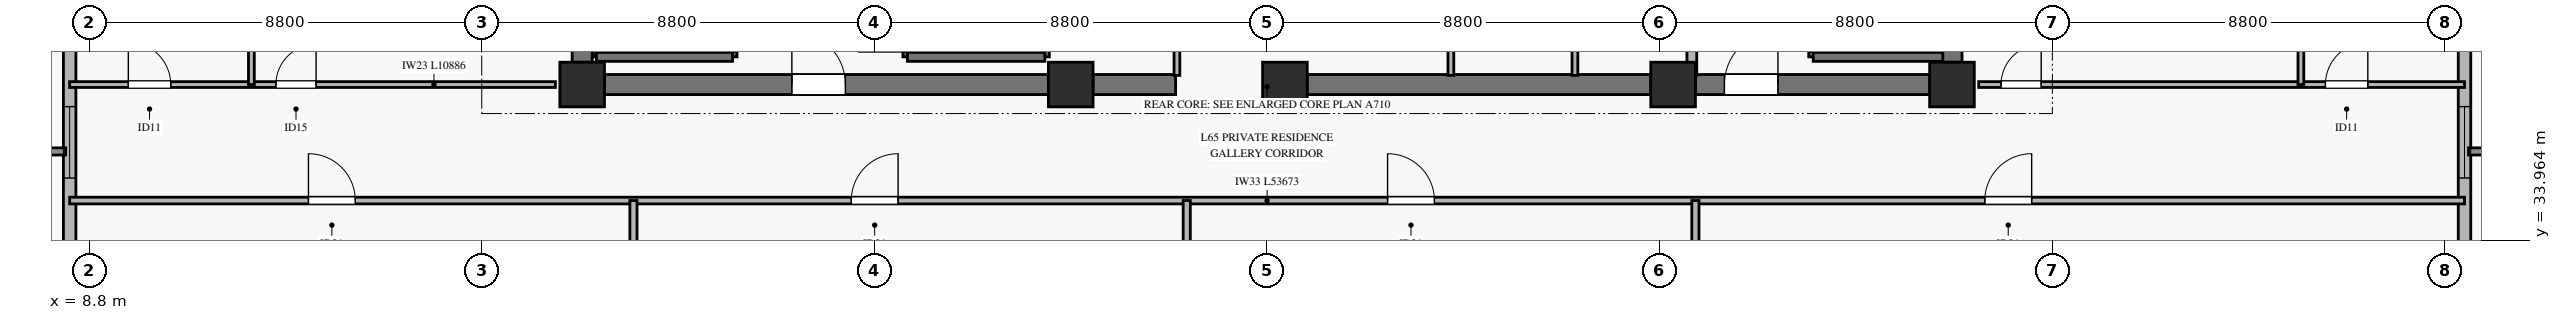
"""IFC4 building model, lengths in metres.
Left out: names, types, materials, properties, quantities, classifications, styles, units other than length and angle.
Written with IfcOpenShell. Run it as: python <this file> out.ifc"""

import sys

from ifc_helpers import new_model, si_unit, direction, frame, frame_2d, origin, origin_2d, place, context, subcontext, project, spatial, rectangle, extrude, source, transform, mapped, element, fill, save


model = new_model("IFC4")
c1 = context("Model", 3, precision=1e-05, world=origin(), true_north=direction((0.0, 1.0)))
c2 = subcontext(c1, "Body", "Model", "MODEL_VIEW")
j1 = project(units=[si_unit("LENGTHUNIT", "METRE"), si_unit("PLANEANGLEUNIT", "RADIAN")], contexts=[c1])
p1 = place(None, origin())
s1 = spatial("IfcSite", under=j1, at=p1, CompositionType="ELEMENT")
p2 = place(p1, origin())
s2 = spatial("IfcBuilding", under=s1, at=p2, CompositionType="ELEMENT")
p3 = place(p2, frame((0.0, 0.0, 255.3)))
s3 = spatial("IfcBuildingStorey", under=s2, at=p3, CompositionType="ELEMENT", Elevation=255.3)
m1 = source(origin(), c2, "Body", "SweptSolid", [
    extrude(rectangle(XDim=1.0, YDim=1.0, at=origin_2d()), origin(), (0.0, 0.0, 1.0), 3.185),
])
for number, where, z_axis, x_axis in (
    (1, (19.85, 37.45, 0.0), (0.0, 0.0, 1.0), (1.0, 0.0, 0.0)),
    (2, (30.8, 37.45, 0.0), (0.0, 0.0, 1.0), (1.0, 0.0, 0.0)),
    (3, (35.6, 37.45, 0.0), (0.0, 0.0, 1.0), (1.0, 0.0, 0.0)),
    (4, (44.3, 37.45, 0.0), (0.0, 0.0, 1.0), (1.0, 0.0, 0.0)),
    (5, (50.55, 37.45, 0.0), (0.0, 0.0, 1.0), (1.0, 0.0, 0.0)),
):
    element("IfcColumn", number, at=place(p3, frame(where, z_axis=z_axis, x_axis=x_axis)), inside=s3, PredefinedType="PILASTER", context=c2, shape_type="MappedRepresentation", body=[
        mapped(m1, transform((0.0, 0.0, 0.0), x_axis=(1.0, 0.0, 0.0), y_axis=(0.0, 1.0, 0.0), z_axis=(0.0, 0.0, 1.0), scale=1.0)),
    ])
p4 = place(p3, frame((20.35, 37.45, 0.0), z_axis=(0.0, 0.0, 1.0), x_axis=(1.0, 0.0, 0.0)))
e6 = element("IfcWall", 6, at=p4, inside=s3, PredefinedType="SHEAR", context=c2, shape_type="SweptSolid", body=[
    extrude(rectangle(XDim=9.95, YDim=0.45, at=frame_2d((4.975, 0.0))), origin(), (0.0, 0.0, 1.0), 3.185),
])
p5 = place(p4, frame((4.2, 0.0, 0.0)))
e7 = element("IfcOpeningElement", 7, at=p5, cuts=e6, PredefinedType="OPENING", context=c2, shape_type="SweptSolid", body=[
    extrude(rectangle(XDim=1.2, YDim=2.15, at=frame_2d((0.6, 1.075))), frame((0.0, 0.235, 0.0), z_axis=(0.0, -1.0, 0.0), x_axis=(1.0, 0.0, 0.0)), (0.0, 0.0, 1.0), 0.47),
])
p6 = place(p3, frame((31.3, 37.45, 0.0), z_axis=(0.0, 0.0, 1.0), x_axis=(1.0, 0.0, 0.0)))
e8 = element("IfcWall", 8, at=p6, inside=s3, PredefinedType="SHEAR", context=c2, shape_type="SweptSolid", body=[
    extrude(rectangle(XDim=1.85, YDim=0.45, at=frame_2d((0.925, 0.0))), origin(), (0.0, 0.0, 1.0), 3.185),
])
p7 = place(p3, frame((36.1, 37.45, 0.0), z_axis=(0.0, 0.0, 1.0), x_axis=(1.0, 0.0, 0.0)))
e9 = element("IfcWall", 9, at=p7, inside=s3, PredefinedType="SHEAR", context=c2, shape_type="SweptSolid", body=[
    extrude(rectangle(XDim=7.7, YDim=0.45, at=frame_2d((3.85, 0.0))), origin(), (0.0, 0.0, 1.0), 3.185),
])
p8 = place(p3, frame((44.8, 37.45, 0.0), z_axis=(0.0, 0.0, 1.0), x_axis=(1.0, 0.0, 0.0)))
e10 = element("IfcWall", 10, at=p8, inside=s3, PredefinedType="SHEAR", context=c2, shape_type="SweptSolid", body=[
    extrude(rectangle(XDim=5.25, YDim=0.45, at=frame_2d((2.625, 0.0))), origin(), (0.0, 0.0, 1.0), 3.185),
])
p9 = place(p8, frame((0.65, 0.0, 0.0)))
e11 = element("IfcOpeningElement", 11, at=p9, cuts=e10, PredefinedType="OPENING", context=c2, shape_type="SweptSolid", body=[
    extrude(rectangle(XDim=1.2, YDim=2.15, at=frame_2d((0.6, 1.075))), frame((0.0, 0.235, 0.0), z_axis=(0.0, -1.0, 0.0), x_axis=(1.0, 0.0, 0.0)), (0.0, 0.0, 1.0), 0.47),
])
for number, where, z_axis, x_axis in (
    (12, (19.85, 37.95, 0.0), (0.0, 0.0, 1.0), (0.0, 1.0, 0.0)),
    (13, (50.55, 37.95, 0.0), (0.0, 0.0, 1.0), (0.0, 1.0, 0.0)),
):
    element("IfcWall", number, at=place(p3, frame(where, z_axis=z_axis, x_axis=x_axis)), inside=s3, PredefinedType="SHEAR", context=c2, shape_type="SweptSolid", body=[
        extrude(rectangle(XDim=8.1, YDim=0.45, at=frame_2d((4.05, 0.0))), origin(), (0.0, 0.0, 1.0), 3.185),
    ])
p10 = place(p3, frame((8.364, 30.857, 0.0), z_axis=(0.0, 0.0, 1.0), x_axis=(0.0, 1.0, 0.0)))
e14 = element("IfcWall", 14, at=p10, inside=s3, PredefinedType="SOLIDWALL", context=c2, shape_type="SweptSolid", body=[
    extrude(rectangle(XDim=12.628, YDim=0.28, at=frame_2d((6.314, 0.0))), origin(), (0.0, 0.0, 1.0), 2.815),
])
p11 = place(p10, frame((4.498, 0.0, 0.45)))
e15 = element("IfcOpeningElement", 15, at=p11, cuts=e14, PredefinedType="OPENING", context=c2, shape_type="SweptSolid", body=[
    extrude(rectangle(XDim=1.6, YDim=2.0, at=frame_2d((0.8, 1.0))), frame((0.0, 0.15, 0.0), z_axis=(0.0, -1.0, 0.0), x_axis=(1.0, 0.0, 0.0)), (0.0, 0.0, 1.0), 0.3),
])
p12 = place(p3, frame((62.037, 30.857, 0.0), z_axis=(0.0, 0.0, 1.0), x_axis=(0.0, 1.0, 0.0)))
e16 = element("IfcWall", 16, at=p12, inside=s3, PredefinedType="SOLIDWALL", context=c2, shape_type="SweptSolid", body=[
    extrude(rectangle(XDim=12.628, YDim=0.28, at=frame_2d((6.314, 0.0))), origin(), (0.0, 0.0, 1.0), 2.815),
])
p13 = place(p12, frame((4.498, 0.0, 0.45)))
e17 = element("IfcOpeningElement", 17, at=p13, cuts=e16, PredefinedType="OPENING", context=c2, shape_type="SweptSolid", body=[
    extrude(rectangle(XDim=1.6, YDim=2.0, at=frame_2d((0.8, 1.0))), frame((0.0, 0.15, 0.0), z_axis=(0.0, -1.0, 0.0), x_axis=(1.0, 0.0, 0.0)), (0.0, 0.0, 1.0), 0.3),
])
p14 = place(p3, frame((20.17, 38.07, 0.0), z_axis=(0.0, 0.0, 1.0), x_axis=(0.0, 1.0, 0.0)))
e18 = element("IfcWall", 18, at=p14, inside=s3, PredefinedType="SOLIDWALL", context=c2, shape_type="SweptSolid", body=[
    extrude(rectangle(XDim=7.25, YDim=0.14, at=frame_2d((3.625, 0.0))), origin(), (0.0, 0.0, 1.0), 3.4),
])
p15 = place(p3, frame((23.22, 38.07, 0.0), z_axis=(0.0, 0.0, 1.0), x_axis=(0.0, 1.0, 0.0)))
e19 = element("IfcWall", 19, at=p15, inside=s3, PredefinedType="SOLIDWALL", context=c2, shape_type="SweptSolid", body=[
    extrude(rectangle(XDim=7.25, YDim=0.2, at=frame_2d((3.625, 0.0))), origin(), (0.0, 0.0, 1.0), 3.4),
])
p16 = place(p15, frame((0.11, 0.0, 0.0)))
e20 = element("IfcOpeningElement", 20, at=p16, cuts=e19, PredefinedType="OPENING", context=c2, shape_type="SweptSolid", body=[
    extrude(rectangle(XDim=1.1, YDim=2.15, at=frame_2d((0.55, 1.075))), frame((0.0, 0.11, 0.0), z_axis=(0.0, -1.0, 0.0), x_axis=(1.0, 0.0, 0.0)), (0.0, 0.0, 1.0), 0.22),
])
p17 = place(p3, frame((20.17, 38.07, 0.0), z_axis=(0.0, 0.0, 1.0), x_axis=(1.0, 0.0, 0.0)))
e21 = element("IfcWall", 21, at=p17, inside=s3, PredefinedType="SOLIDWALL", context=c2, shape_type="SweptSolid", body=[
    extrude(rectangle(XDim=3.05, YDim=0.2, at=frame_2d((1.525, 0.0))), origin(), (0.0, 0.0, 1.0), 3.4),
])
p18 = place(p3, frame((27.14, 38.07, 0.0), z_axis=(0.0, 0.0, 1.0), x_axis=(0.0, 1.0, 0.0)))
e22 = element("IfcWall", 22, at=p18, inside=s3, PredefinedType="SOLIDWALL", context=c2, shape_type="SweptSolid", body=[
    extrude(rectangle(XDim=7.25, YDim=0.2, at=frame_2d((3.625, 0.0))), origin(), (0.0, 0.0, 1.0), 3.4),
])
p19 = place(p18, frame((0.11, 0.0, 0.0)))
e23 = element("IfcOpeningElement", 23, at=p19, cuts=e22, PredefinedType="OPENING", context=c2, shape_type="SweptSolid", body=[
    extrude(rectangle(XDim=1.1, YDim=2.15, at=frame_2d((0.55, 1.075))), frame((0.0, 0.11, 0.0), z_axis=(0.0, -1.0, 0.0), x_axis=(1.0, 0.0, 0.0)), (0.0, 0.0, 1.0), 0.22),
])
p20 = place(p3, frame((30.22, 38.07, 0.0), z_axis=(0.0, 0.0, 1.0), x_axis=(0.0, 1.0, 0.0)))
e24 = element("IfcWall", 24, at=p20, inside=s3, PredefinedType="SOLIDWALL", context=c2, shape_type="SweptSolid", body=[
    extrude(rectangle(XDim=7.25, YDim=0.2, at=frame_2d((3.625, 0.0))), origin(), (0.0, 0.0, 1.0), 3.4),
])
p21 = place(p3, frame((27.14, 38.07, 0.0), z_axis=(0.0, 0.0, 1.0), x_axis=(1.0, 0.0, 0.0)))
e25 = element("IfcWall", 25, at=p21, inside=s3, PredefinedType="SOLIDWALL", context=c2, shape_type="SweptSolid", body=[
    extrude(rectangle(XDim=3.08, YDim=0.2, at=frame_2d((1.54, 0.0))), origin(), (0.0, 0.0, 1.0), 3.4),
])
p22 = place(p3, frame((47.44, 38.07, 0.0), z_axis=(0.0, 0.0, 1.0), x_axis=(0.0, 1.0, 0.0)))
e26 = element("IfcWall", 26, at=p22, inside=s3, PredefinedType="SOLIDWALL", context=c2, shape_type="SweptSolid", body=[
    extrude(rectangle(XDim=7.25, YDim=0.2, at=frame_2d((3.625, 0.0))), origin(), (0.0, 0.0, 1.0), 3.4),
])
p23 = place(p22, frame((0.11, 0.0, 0.0)))
e27 = element("IfcOpeningElement", 27, at=p23, cuts=e26, PredefinedType="OPENING", context=c2, shape_type="SweptSolid", body=[
    extrude(rectangle(XDim=1.1, YDim=2.15, at=frame_2d((0.55, 1.075))), frame((0.0, 0.11, 0.0), z_axis=(0.0, -1.0, 0.0), x_axis=(1.0, 0.0, 0.0)), (0.0, 0.0, 1.0), 0.22),
])
p24 = place(p3, frame((47.44, 38.07, 0.0), z_axis=(0.0, 0.0, 1.0), x_axis=(1.0, 0.0, 0.0)))
e28 = element("IfcWall", 28, at=p24, inside=s3, PredefinedType="SOLIDWALL", context=c2, shape_type="SweptSolid", body=[
    extrude(rectangle(XDim=2.905, YDim=0.2, at=frame_2d((1.453, 0.0))), origin(), (0.0, 0.0, 1.0), 3.4),
])
p25 = place(p3, frame((44.72, 37.655, 0.0), z_axis=(0.0, 0.0, 1.0), x_axis=(0.0, 1.0, 0.0)))
e29 = element("IfcWall", 29, at=p25, inside=s3, PredefinedType="SOLIDWALL", context=c2, shape_type="SweptSolid", body=[
    extrude(rectangle(XDim=7.565, YDim=0.22, at=frame_2d((3.782, 0.0))), origin(), (0.0, 0.0, 1.0), 3.185),
])
p26 = place(p3, frame((33.18, 37.655, 0.0), z_axis=(0.0, 0.0, 1.0), x_axis=(0.0, 1.0, 0.0)))
e30 = element("IfcWall", 30, at=p26, inside=s3, PredefinedType="PARTITIONING", context=c2, shape_type="SweptSolid", body=[
    extrude(rectangle(XDim=6.495, YDim=0.13, at=frame_2d((3.248, 0.0))), origin(), (0.0, 0.0, 1.0), 2.27),
])
p27 = place(p26, frame((0.945, 0.0, 0.0)))
e31 = element("IfcOpeningElement", 31, at=p27, cuts=e30, PredefinedType="OPENING", context=c2, shape_type="SweptSolid", body=[
    extrude(rectangle(XDim=0.9, YDim=2.1, at=frame_2d((0.45, 1.05))), frame((0.0, 0.075, 0.0), z_axis=(0.0, -1.0, 0.0), x_axis=(1.0, 0.0, 0.0)), (0.0, 0.0, 1.0), 0.15),
])
p28 = place(p26, frame((3.845, 0.0, 0.0)))
e32 = element("IfcOpeningElement", 32, at=p28, cuts=e30, PredefinedType="OPENING", context=c2, shape_type="SweptSolid", body=[
    extrude(rectangle(XDim=0.9, YDim=2.1, at=frame_2d((0.45, 1.05))), frame((0.0, 0.075, 0.0), z_axis=(0.0, -1.0, 0.0), x_axis=(1.0, 0.0, 0.0)), (0.0, 0.0, 1.0), 0.15),
])
p29 = place(p3, frame((39.32, 37.655, 0.0), z_axis=(0.0, 0.0, 1.0), x_axis=(0.0, 1.0, 0.0)))
e33 = element("IfcWall", 33, at=p29, inside=s3, PredefinedType="PARTITIONING", context=c2, shape_type="SweptSolid", body=[
    extrude(rectangle(XDim=8.69, YDim=0.13, at=frame_2d((4.345, 0.0))), origin(), (0.0, 0.0, 1.0), 3.185),
])
p30 = place(p29, frame((4.865, 0.0, 0.0)))
e34 = element("IfcOpeningElement", 34, at=p30, cuts=e33, PredefinedType="OPENING", context=c2, shape_type="SweptSolid", body=[
    extrude(rectangle(XDim=0.9, YDim=2.1, at=frame_2d((0.45, 1.05))), frame((0.0, 0.075, 0.0), z_axis=(0.0, -1.0, 0.0), x_axis=(1.0, 0.0, 0.0)), (0.0, 0.0, 1.0), 0.15),
])
p31 = place(p3, frame((42.1, 37.655, 0.0), z_axis=(0.0, 0.0, 1.0), x_axis=(0.0, 1.0, 0.0)))
e35 = element("IfcWall", 35, at=p31, inside=s3, PredefinedType="PARTITIONING", context=c2, shape_type="SweptSolid", body=[
    extrude(rectangle(XDim=8.69, YDim=0.13, at=frame_2d((4.345, 0.0))), origin(), (0.0, 0.0, 1.0), 3.185),
])
p32 = place(p31, frame((2.145, 0.0, 0.0)))
e36 = element("IfcOpeningElement", 36, at=p32, cuts=e35, PredefinedType="OPENING", context=c2, shape_type="SweptSolid", body=[
    extrude(rectangle(XDim=0.9, YDim=2.1, at=frame_2d((0.45, 1.05))), frame((0.0, 0.075, 0.0), z_axis=(0.0, -1.0, 0.0), x_axis=(1.0, 0.0, 0.0)), (0.0, 0.0, 1.0), 0.15),
])
p33 = place(p3, frame((8.364, 34.85, 0.0), z_axis=(0.0, 0.0, 1.0), x_axis=(1.0, 0.0, 0.0)))
e37 = element("IfcWall", 37, at=p33, inside=s3, PredefinedType="PARTITIONING", context=c2, shape_type="SweptSolid", body=[
    extrude(rectangle(XDim=53.673, YDim=0.15, at=frame_2d((26.836, 0.0))), origin(), (0.0, 0.0, 1.0), 2.47),
])
p34 = place(p33, frame((5.352, 0.0, 0.0)))
e38 = element("IfcOpeningElement", 38, at=p34, cuts=e37, PredefinedType="OPENING", context=c2, shape_type="SweptSolid", body=[
    extrude(rectangle(XDim=1.05, YDim=2.15, at=frame_2d((0.525, 1.075))), frame((0.0, 0.085, 0.0), z_axis=(0.0, -1.0, 0.0), x_axis=(1.0, 0.0, 0.0)), (0.0, 0.0, 1.0), 0.17),
])
p35 = place(p33, frame((17.517, 0.0, 0.0)))
e39 = element("IfcOpeningElement", 39, at=p35, cuts=e37, PredefinedType="OPENING", context=c2, shape_type="SweptSolid", body=[
    extrude(rectangle(XDim=1.05, YDim=2.15, at=frame_2d((0.525, 1.075))), frame((0.0, 0.085, 0.0), z_axis=(0.0, -1.0, 0.0), x_axis=(1.0, 0.0, 0.0)), (0.0, 0.0, 1.0), 0.17),
])
p36 = place(p33, frame((29.537, 0.0, 0.0)))
e40 = element("IfcOpeningElement", 40, at=p36, cuts=e37, PredefinedType="OPENING", context=c2, shape_type="SweptSolid", body=[
    extrude(rectangle(XDim=1.05, YDim=2.15, at=frame_2d((0.525, 1.075))), frame((0.0, 0.085, 0.0), z_axis=(0.0, -1.0, 0.0), x_axis=(1.0, 0.0, 0.0)), (0.0, 0.0, 1.0), 0.17),
])
p37 = place(p33, frame((42.922, 0.0, 0.0)))
e41 = element("IfcOpeningElement", 41, at=p37, cuts=e37, PredefinedType="OPENING", context=c2, shape_type="SweptSolid", body=[
    extrude(rectangle(XDim=1.05, YDim=2.15, at=frame_2d((0.525, 1.075))), frame((0.0, 0.085, 0.0), z_axis=(0.0, -1.0, 0.0), x_axis=(1.0, 0.0, 0.0)), (0.0, 0.0, 1.0), 0.17),
])
for number, where, z_axis, x_axis in (
    (42, (21.0, 15.113, 0.0), (0.0, 0.0, 1.0), (0.0, 1.0, 0.0)),
    (43, (33.4, 15.113, 0.0), (0.0, 0.0, 1.0), (0.0, 1.0, 0.0)),
    (44, (44.8, 15.113, 0.0), (0.0, 0.0, 1.0), (0.0, 1.0, 0.0)),
):
    element("IfcWall", number, at=place(p3, frame(where, z_axis=z_axis, x_axis=x_axis)), inside=s3, PredefinedType="PARTITIONING", context=c2, shape_type="SweptSolid", body=[
        extrude(rectangle(XDim=19.737, YDim=0.16, at=frame_2d((9.869, 0.0))), origin(), (0.0, 0.0, 1.0), 2.77),
    ])
p38 = place(p3, frame((8.364, 37.45, 0.0), z_axis=(0.0, 0.0, 1.0), x_axis=(1.0, 0.0, 0.0)))
e45 = element("IfcWall", 45, at=p38, inside=s3, PredefinedType="PARTITIONING", context=c2, shape_type="SweptSolid", body=[
    extrude(rectangle(XDim=10.886, YDim=0.13, at=frame_2d((5.443, 0.0))), origin(), (0.0, 0.0, 1.0), 2.82),
])
p39 = place(p38, frame((1.315, 0.0, 0.0)))
e46 = element("IfcOpeningElement", 46, at=p39, cuts=e45, PredefinedType="OPENING", context=c2, shape_type="SweptSolid", body=[
    extrude(rectangle(XDim=0.95, YDim=2.1, at=frame_2d((0.475, 1.05))), frame((0.0, 0.075, 0.0), z_axis=(0.0, -1.0, 0.0), x_axis=(1.0, 0.0, 0.0)), (0.0, 0.0, 1.0), 0.15),
])
p40 = place(p38, frame((4.623, 0.0, 0.0)))
e47 = element("IfcOpeningElement", 47, at=p40, cuts=e45, PredefinedType="OPENING", context=c2, shape_type="SweptSolid", body=[
    extrude(rectangle(XDim=0.9, YDim=2.1, at=frame_2d((0.45, 1.05))), frame((0.0, 0.075, 0.0), z_axis=(0.0, -1.0, 0.0), x_axis=(1.0, 0.0, 0.0)), (0.0, 0.0, 1.0), 0.15),
])
p41 = place(p3, frame((12.437, 37.45, 0.0), z_axis=(0.0, 0.0, 1.0), x_axis=(0.0, 1.0, 0.0)))
e48 = element("IfcWall", 48, at=p41, inside=s3, PredefinedType="PARTITIONING", context=c2, shape_type="SweptSolid", body=[
    extrude(rectangle(XDim=8.8, YDim=0.13, at=frame_2d((4.4, 0.0))), origin(), (0.0, 0.0, 1.0), 3.185),
])
p42 = place(p3, frame((51.15, 37.45, 0.0), z_axis=(0.0, 0.0, 1.0), x_axis=(1.0, 0.0, 0.0)))
e49 = element("IfcWall", 49, at=p42, inside=s3, PredefinedType="PARTITIONING", context=c2, shape_type="SweptSolid", body=[
    extrude(rectangle(XDim=10.887, YDim=0.13, at=frame_2d((5.444, 0.0))), origin(), (0.0, 0.0, 1.0), 2.82),
])
p43 = place(p42, frame((0.5, 0.0, 0.0)))
e50 = element("IfcOpeningElement", 50, at=p43, cuts=e49, PredefinedType="OPENING", context=c2, shape_type="SweptSolid", body=[
    extrude(rectangle(XDim=0.9, YDim=2.1, at=frame_2d((0.45, 1.05))), frame((0.0, 0.075, 0.0), z_axis=(0.0, -1.0, 0.0), x_axis=(1.0, 0.0, 0.0)), (0.0, 0.0, 1.0), 0.15),
])
p44 = place(p42, frame((7.77, 0.0, 0.0)))
e51 = element("IfcOpeningElement", 51, at=p44, cuts=e49, PredefinedType="OPENING", context=c2, shape_type="SweptSolid", body=[
    extrude(rectangle(XDim=0.95, YDim=2.1, at=frame_2d((0.475, 1.05))), frame((0.0, 0.075, 0.0), z_axis=(0.0, -1.0, 0.0), x_axis=(1.0, 0.0, 0.0)), (0.0, 0.0, 1.0), 0.15),
])
p45 = place(p3, frame((58.37, 37.45, 0.0), z_axis=(0.0, 0.0, 1.0), x_axis=(0.0, 1.0, 0.0)))
e52 = element("IfcWall", 52, at=p45, inside=s3, PredefinedType="PARTITIONING", context=c2, shape_type="SweptSolid", body=[
    extrude(rectangle(XDim=8.8, YDim=0.13, at=frame_2d((4.4, 0.0))), origin(), (0.0, 0.0, 1.0), 3.185),
])
m2 = source(origin(), c2, "Body", "SweptSolid", [
    extrude(rectangle(XDim=1.6, YDim=2.0, at=frame_2d((0.8, 1.0))), frame((0.0, 0.03, 0.0), z_axis=(0.0, -1.0, 0.0), x_axis=(1.0, 0.0, 0.0)), (0.0, 0.0, 1.0), 0.06),
])
p46 = place(p11, origin())
e53 = element("IfcWindow", 53, at=p46, inside=s3, PartitioningType="SINGLE_PANEL", PredefinedType="WINDOW", context=c2, shape_type="MappedRepresentation", body=[
    mapped(m2, transform((0.0, 0.0, 0.0), x_axis=(1.0, 0.0, 0.0), y_axis=(0.0, 1.0, 0.0), z_axis=(0.0, 0.0, 1.0), scale=1.0)),
])
fill(e15, e53)
p47 = place(p13, origin())
e54 = element("IfcWindow", 54, at=p47, inside=s3, PartitioningType="SINGLE_PANEL", PredefinedType="WINDOW", context=c2, shape_type="MappedRepresentation", body=[
    mapped(m2, transform((0.0, 0.0, 0.0), x_axis=(1.0, 0.0, 0.0), y_axis=(0.0, 1.0, 0.0), z_axis=(0.0, 0.0, 1.0), scale=1.0)),
])
fill(e17, e54)
m3 = source(origin(), c2, "Body", "SweptSolid", [
    extrude(rectangle(XDim=1.2, YDim=2.15, at=frame_2d((0.6, 1.075))), frame((0.0, 0.025, 0.0), z_axis=(0.0, -1.0, 0.0), x_axis=(1.0, 0.0, 0.0)), (0.0, 0.0, 1.0), 0.05),
])
p48 = place(p5, origin())
e55 = element("IfcDoor", 55, at=p48, inside=s3, OperationType="SINGLE_SWING_LEFT", PredefinedType="DOOR", context=c2, shape_type="MappedRepresentation", body=[
    mapped(m3, transform((0.0, 0.0, 0.0), x_axis=(1.0, 0.0, 0.0), y_axis=(0.0, 1.0, 0.0), z_axis=(0.0, 0.0, 1.0), scale=1.0)),
])
fill(e7, e55)
p49 = place(p9, origin())
e56 = element("IfcDoor", 56, at=p49, inside=s3, OperationType="SINGLE_SWING_RIGHT", PredefinedType="DOOR", context=c2, shape_type="MappedRepresentation", body=[
    mapped(m3, transform((0.0, 0.0, 0.0), x_axis=(1.0, 0.0, 0.0), y_axis=(0.0, 1.0, 0.0), z_axis=(0.0, 0.0, 1.0), scale=1.0)),
])
fill(e11, e56)
m4 = source(origin(), c2, "Body", "SweptSolid", [
    extrude(rectangle(XDim=1.05, YDim=2.15, at=frame_2d((0.525, 1.075))), frame((0.0, 0.025, 0.0), z_axis=(0.0, -1.0, 0.0), x_axis=(1.0, 0.0, 0.0)), (0.0, 0.0, 1.0), 0.05),
])
p50 = place(p34, origin())
e57 = element("IfcDoor", 57, at=p50, inside=s3, OperationType="SINGLE_SWING_LEFT", PredefinedType="DOOR", context=c2, shape_type="MappedRepresentation", body=[
    mapped(m4, transform((0.0, 0.0, 0.0), x_axis=(1.0, 0.0, 0.0), y_axis=(0.0, 1.0, 0.0), z_axis=(0.0, 0.0, 1.0), scale=1.0)),
])
fill(e38, e57)
p51 = place(p35, origin())
e58 = element("IfcDoor", 58, at=p51, inside=s3, OperationType="SINGLE_SWING_RIGHT", PredefinedType="DOOR", context=c2, shape_type="MappedRepresentation", body=[
    mapped(m4, transform((0.0, 0.0, 0.0), x_axis=(1.0, 0.0, 0.0), y_axis=(0.0, 1.0, 0.0), z_axis=(0.0, 0.0, 1.0), scale=1.0)),
])
fill(e39, e58)
p52 = place(p36, origin())
e59 = element("IfcDoor", 59, at=p52, inside=s3, OperationType="SINGLE_SWING_LEFT", PredefinedType="DOOR", context=c2, shape_type="MappedRepresentation", body=[
    mapped(m4, transform((0.0, 0.0, 0.0), x_axis=(1.0, 0.0, 0.0), y_axis=(0.0, 1.0, 0.0), z_axis=(0.0, 0.0, 1.0), scale=1.0)),
])
fill(e40, e59)
p53 = place(p37, origin())
e60 = element("IfcDoor", 60, at=p53, inside=s3, OperationType="SINGLE_SWING_RIGHT", PredefinedType="DOOR", context=c2, shape_type="MappedRepresentation", body=[
    mapped(m4, transform((0.0, 0.0, 0.0), x_axis=(1.0, 0.0, 0.0), y_axis=(0.0, 1.0, 0.0), z_axis=(0.0, 0.0, 1.0), scale=1.0)),
])
fill(e41, e60)
m5 = source(origin(), c2, "Body", "SweptSolid", [
    extrude(rectangle(XDim=0.95, YDim=2.1, at=frame_2d((0.475, 1.05))), frame((0.0, 0.025, 0.0), z_axis=(0.0, -1.0, 0.0), x_axis=(1.0, 0.0, 0.0)), (0.0, 0.0, 1.0), 0.05),
])
p54 = place(p39, origin())
e61 = element("IfcDoor", 61, at=p54, inside=s3, OperationType="SINGLE_SWING_LEFT", PredefinedType="DOOR", context=c2, shape_type="MappedRepresentation", body=[
    mapped(m5, transform((0.0, 0.0, 0.0), x_axis=(1.0, 0.0, 0.0), y_axis=(0.0, 1.0, 0.0), z_axis=(0.0, 0.0, 1.0), scale=1.0)),
])
fill(e46, e61)
m6 = source(origin(), c2, "Body", "SweptSolid", [
    extrude(rectangle(XDim=0.9, YDim=2.1, at=frame_2d((0.45, 1.05))), frame((0.0, 0.025, 0.0), z_axis=(0.0, -1.0, 0.0), x_axis=(1.0, 0.0, 0.0)), (0.0, 0.0, 1.0), 0.05),
])
p55 = place(p40, origin())
e62 = element("IfcDoor", 62, at=p55, inside=s3, OperationType="SINGLE_SWING_RIGHT", PredefinedType="DOOR", context=c2, shape_type="MappedRepresentation", body=[
    mapped(m6, transform((0.0, 0.0, 0.0), x_axis=(1.0, 0.0, 0.0), y_axis=(0.0, 1.0, 0.0), z_axis=(0.0, 0.0, 1.0), scale=1.0)),
])
fill(e47, e62)
p56 = place(p43, origin())
e63 = element("IfcDoor", 63, at=p56, inside=s3, OperationType="SINGLE_SWING_RIGHT", PredefinedType="DOOR", context=c2, shape_type="MappedRepresentation", body=[
    mapped(m6, transform((0.0, 0.0, 0.0), x_axis=(1.0, 0.0, 0.0), y_axis=(0.0, 1.0, 0.0), z_axis=(0.0, 0.0, 1.0), scale=1.0)),
])
fill(e50, e63)
p57 = place(p44, origin())
e64 = element("IfcDoor", 64, at=p57, inside=s3, OperationType="SINGLE_SWING_RIGHT", PredefinedType="DOOR", context=c2, shape_type="MappedRepresentation", body=[
    mapped(m5, transform((0.0, 0.0, 0.0), x_axis=(1.0, 0.0, 0.0), y_axis=(0.0, 1.0, 0.0), z_axis=(0.0, 0.0, 1.0), scale=1.0)),
])
fill(e51, e64)
save(model, sys.argv[1])
